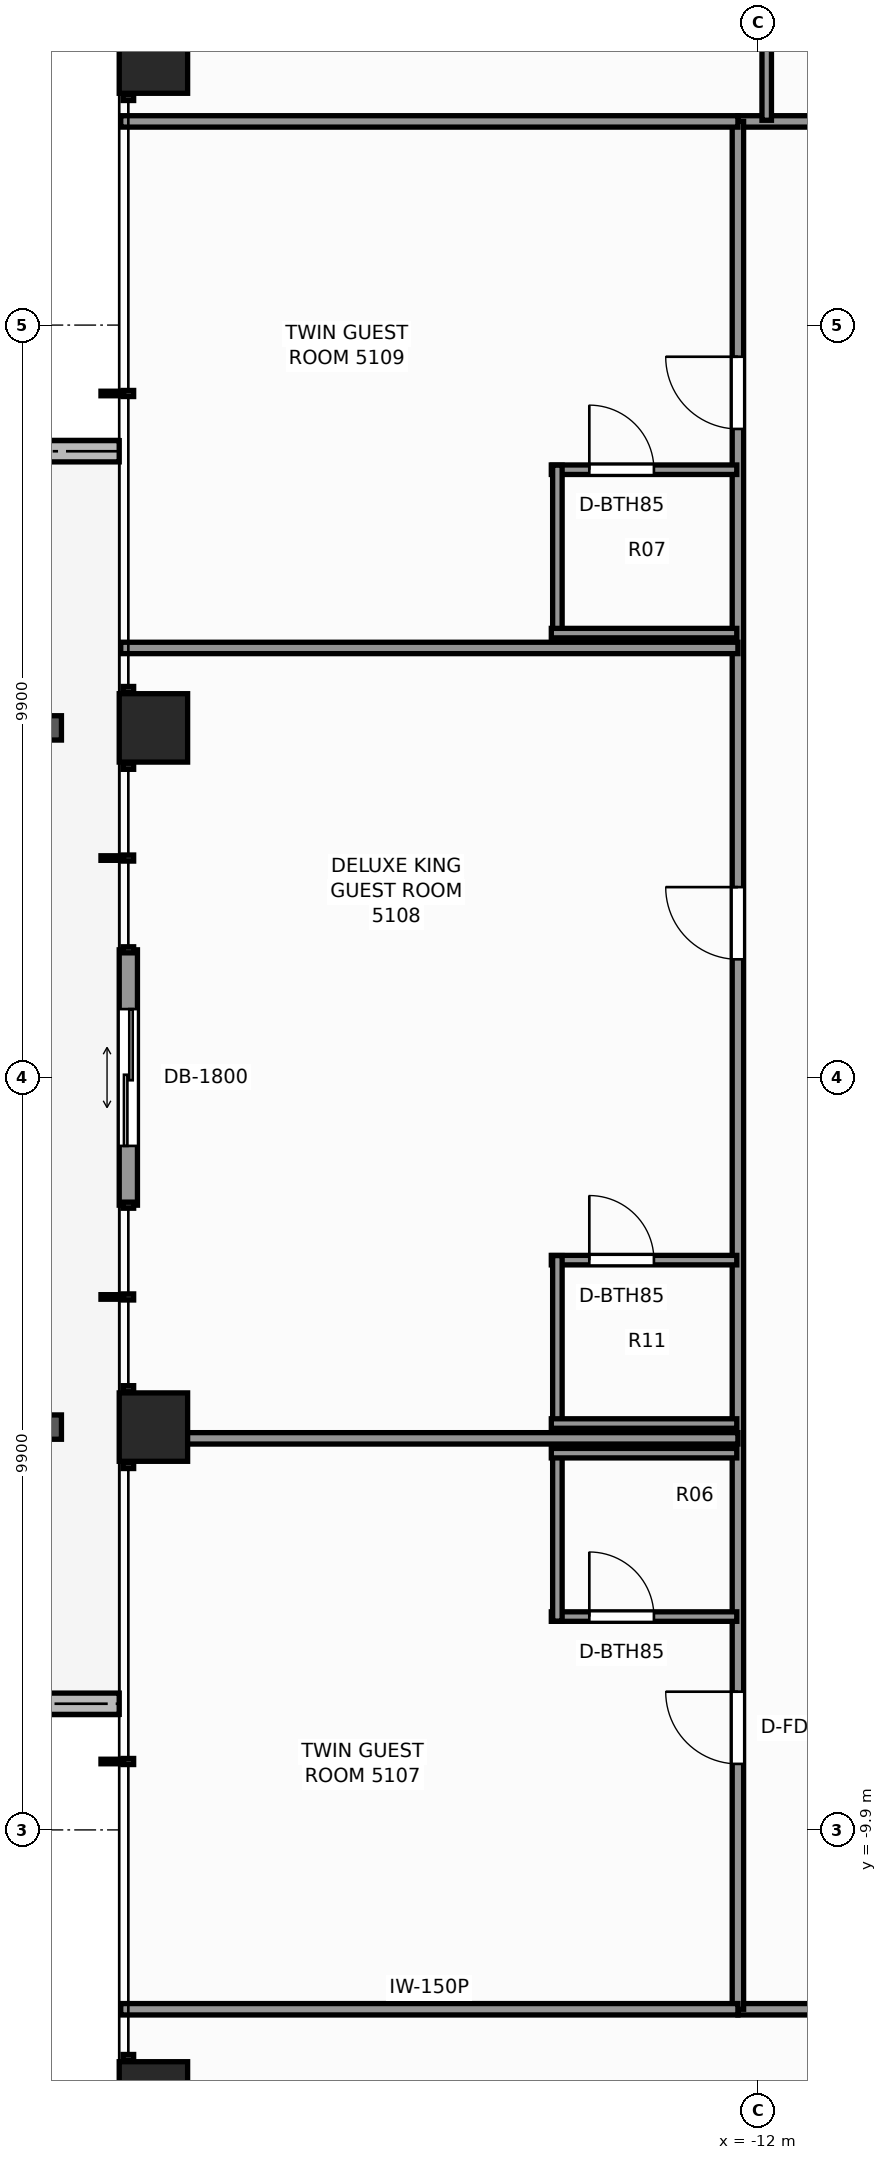
"""IFC4 building model, lengths in metres.
Left out: names, types, materials, properties, quantities, classifications, styles, units other than length and angle.
Written with IfcOpenShell. Run it as: python <this file> out.ifc"""

import sys

from ifc_helpers import new_model, si_unit, direction, frame, frame_2d, origin, origin_2d, place, context, subcontext, project, spatial, rectangle, extrude, element, fill, save


model = new_model("IFC4")
c1 = context("Model", 3, precision=1e-05, world=origin(), true_north=direction((0.0, 1.0)))
c2 = subcontext(c1, "Body", "Model", "MODEL_VIEW")
j1 = project(units=[si_unit("LENGTHUNIT", "METRE"), si_unit("PLANEANGLEUNIT", "RADIAN")], contexts=[c1])
p1 = place(None, origin())
s1 = spatial("IfcSite", under=j1, at=p1, CompositionType="ELEMENT")
p2 = place(p1, origin())
s2 = spatial("IfcBuilding", under=s1, at=p2, CompositionType="ELEMENT")
p3 = place(p2, frame((0.0, 0.0, 176.7)))
s3 = spatial("IfcBuildingStorey", under=s2, at=p3, CompositionType="ELEMENT", Elevation=176.7)
for number, where, z_axis, x_axis in (
    (1, (-19.95, -13.4, 0.0), (0.0, 0.0, 1.0), (1.0, 0.0, 0.0)),
    (2, (-19.95, -4.6, 0.0), (0.0, 0.0, 1.0), (1.0, 0.0, 0.0)),
    (3, (-19.95, 4.6, 0.0), (0.0, 0.0, 1.0), (1.0, 0.0, 0.0)),
    (4, (-19.95, 13.4, 0.0), (0.0, 0.0, 1.0), (1.0, 0.0, 0.0)),
):
    element("IfcColumn", number, at=place(p3, frame(where, z_axis=z_axis, x_axis=x_axis)), inside=s3, PredefinedType="COLUMN", context=c2, shape_type="SweptSolid", body=[
        extrude(rectangle(XDim=0.9, YDim=0.9, at=origin_2d()), origin(), (0.0, 0.0, 1.0), 3.3),
    ])
p4 = place(p3, frame((-22.406, -8.24, -0.04), z_axis=(0.0, 0.0, 1.0), x_axis=(1.0, 0.0, 0.0)))
e5 = element("IfcWall", 5, at=p4, inside=s3, PredefinedType="PARAPET", context=c2, shape_type="SweptSolid", body=[
    extrude(rectangle(XDim=2.006, YDim=0.28, at=frame_2d((1.003, 0.0))), origin(), (0.0, 0.0, 1.0), 0.42),
])
p5 = place(p3, frame((-20.4, 8.24, -0.04), z_axis=(0.0, 0.0, 1.0), x_axis=(-1.0, 0.0, 0.0)))
e6 = element("IfcWall", 6, at=p5, inside=s3, PredefinedType="PARAPET", context=c2, shape_type="SweptSolid", body=[
    extrude(rectangle(XDim=1.26, YDim=0.28, at=frame_2d((0.63, 0.0))), origin(), (0.0, 0.0, 1.0), 0.42),
])
p6 = place(p3, frame((-20.28, -1.68, 0.0), z_axis=(0.0, 0.0, 1.0), x_axis=(0.0, 1.0, 0.0)))
e7 = element("IfcWall", 7, at=p6, inside=s3, PredefinedType="STANDARD", context=c2, shape_type="SweptSolid", body=[
    extrude(rectangle(XDim=3.36, YDim=0.24, at=frame_2d((1.68, 0.0))), origin(), (0.0, 0.0, 1.0), 3.08),
])
p7 = place(p6, frame((0.78, 0.0, 0.0)))
e8 = element("IfcOpeningElement", 8, at=p7, cuts=e7, PredefinedType="OPENING", context=c2, shape_type="SweptSolid", body=[
    extrude(rectangle(XDim=1.8, YDim=2.2, at=frame_2d((0.9, 1.1))), frame((0.0, 0.13, 0.0), z_axis=(0.0, -1.0, 0.0), x_axis=(1.0, 0.0, 0.0)), (0.0, 0.0, 1.0), 0.26),
])
p8 = place(p3, frame((-12.26, -12.26, 0.0), z_axis=(0.0, 0.0, 1.0), x_axis=(1.0, 0.0, 0.0)))
e9 = element("IfcWall", 9, at=p8, inside=s3, PredefinedType="PARTITIONING", context=c2, shape_type="SweptSolid", body=[
    extrude(rectangle(XDim=24.84, YDim=0.15, at=frame_2d((12.42, 0.0))), origin(), (0.0, 0.0, 1.0), 2.369),
])
p9 = place(p8, frame((2.944, 0.0, 0.0)))
e10 = element("IfcOpeningElement", 10, at=p9, cuts=e9, PredefinedType="OPENING", context=c2, shape_type="SweptSolid", body=[
    extrude(rectangle(XDim=0.9, YDim=2.06, at=frame_2d((0.45, 1.03))), frame((0.0, 0.085, 0.0), z_axis=(0.0, -1.0, 0.0), x_axis=(1.0, 0.0, 0.0)), (0.0, 0.0, 1.0), 0.17),
])
p10 = place(p8, frame((4.945, 0.0, 0.0)))
e11 = element("IfcOpeningElement", 11, at=p10, cuts=e9, PredefinedType="OPENING", context=c2, shape_type="SweptSolid", body=[
    extrude(rectangle(XDim=0.9, YDim=2.06, at=frame_2d((0.45, 1.03))), frame((0.0, 0.085, 0.0), z_axis=(0.0, -1.0, 0.0), x_axis=(1.0, 0.0, 0.0)), (0.0, 0.0, 1.0), 0.17),
])
p11 = place(p8, frame((8.611, 0.0, 0.0)))
e12 = element("IfcOpeningElement", 12, at=p11, cuts=e9, PredefinedType="OPENING", context=c2, shape_type="SweptSolid", body=[
    extrude(rectangle(XDim=0.95, YDim=2.06, at=frame_2d((0.475, 1.03))), frame((0.0, 0.085, 0.0), z_axis=(0.0, -1.0, 0.0), x_axis=(1.0, 0.0, 0.0)), (0.0, 0.0, 1.0), 0.17),
])
p12 = place(p8, frame((13.84, 0.0, 0.0)))
e13 = element("IfcOpeningElement", 13, at=p12, cuts=e9, PredefinedType="OPENING", context=c2, shape_type="SweptSolid", body=[
    extrude(rectangle(XDim=0.9, YDim=2.06, at=frame_2d((0.45, 1.03))), frame((0.0, 0.085, 0.0), z_axis=(0.0, -1.0, 0.0), x_axis=(1.0, 0.0, 0.0)), (0.0, 0.0, 1.0), 0.17),
])
p13 = place(p8, frame((18.5, 0.0, 0.0)))
e14 = element("IfcOpeningElement", 14, at=p13, cuts=e9, PredefinedType="OPENING", context=c2, shape_type="SweptSolid", body=[
    extrude(rectangle(XDim=0.9, YDim=2.06, at=frame_2d((0.45, 1.03))), frame((0.0, 0.085, 0.0), z_axis=(0.0, -1.0, 0.0), x_axis=(1.0, 0.0, 0.0)), (0.0, 0.0, 1.0), 0.17),
])
p14 = place(p8, frame((20.552, 0.0, 0.0)))
e15 = element("IfcOpeningElement", 15, at=p14, cuts=e9, PredefinedType="OPENING", context=c2, shape_type="SweptSolid", body=[
    extrude(rectangle(XDim=0.95, YDim=2.06, at=frame_2d((0.475, 1.03))), frame((0.0, 0.085, 0.0), z_axis=(0.0, -1.0, 0.0), x_axis=(1.0, 0.0, 0.0)), (0.0, 0.0, 1.0), 0.17),
])
p15 = place(p3, frame((-12.26, 12.58, 0.0), z_axis=(0.0, 0.0, 1.0), x_axis=(1.0, 0.0, 0.0)))
e16 = element("IfcWall", 16, at=p15, inside=s3, PredefinedType="PARTITIONING", context=c2, shape_type="SweptSolid", body=[
    extrude(rectangle(XDim=24.84, YDim=0.15, at=frame_2d((12.42, 0.0))), origin(), (0.0, 0.0, 1.0), 2.369),
])
p16 = place(p15, frame((3.323, 0.0, 0.0)))
e17 = element("IfcOpeningElement", 17, at=p16, cuts=e16, PredefinedType="OPENING", context=c2, shape_type="SweptSolid", body=[
    extrude(rectangle(XDim=0.95, YDim=2.06, at=frame_2d((0.475, 1.03))), frame((0.0, 0.085, 0.0), z_axis=(0.0, -1.0, 0.0), x_axis=(1.0, 0.0, 0.0)), (0.0, 0.0, 1.0), 0.17),
])
p17 = place(p15, frame((5.538, 0.0, 0.0)))
e18 = element("IfcOpeningElement", 18, at=p17, cuts=e16, PredefinedType="OPENING", context=c2, shape_type="SweptSolid", body=[
    extrude(rectangle(XDim=0.9, YDim=2.06, at=frame_2d((0.45, 1.03))), frame((0.0, 0.085, 0.0), z_axis=(0.0, -1.0, 0.0), x_axis=(1.0, 0.0, 0.0)), (0.0, 0.0, 1.0), 0.17),
])
p18 = place(p15, frame((10.153, 0.0, 0.0)))
e19 = element("IfcOpeningElement", 19, at=p18, cuts=e16, PredefinedType="OPENING", context=c2, shape_type="SweptSolid", body=[
    extrude(rectangle(XDim=0.95, YDim=2.06, at=frame_2d((0.475, 1.03))), frame((0.0, 0.085, 0.0), z_axis=(0.0, -1.0, 0.0), x_axis=(1.0, 0.0, 0.0)), (0.0, 0.0, 1.0), 0.17),
])
p19 = place(p15, frame((18.497, 0.0, 0.0)))
e20 = element("IfcOpeningElement", 20, at=p19, cuts=e16, PredefinedType="OPENING", context=c2, shape_type="SweptSolid", body=[
    extrude(rectangle(XDim=0.95, YDim=2.06, at=frame_2d((0.475, 1.03))), frame((0.0, 0.085, 0.0), z_axis=(0.0, -1.0, 0.0), x_axis=(1.0, 0.0, 0.0)), (0.0, 0.0, 1.0), 0.17),
])
p20 = place(p15, frame((20.836, 0.0, 0.0)))
e21 = element("IfcOpeningElement", 21, at=p20, cuts=e16, PredefinedType="OPENING", context=c2, shape_type="SweptSolid", body=[
    extrude(rectangle(XDim=0.9, YDim=2.06, at=frame_2d((0.45, 1.03))), frame((0.0, 0.085, 0.0), z_axis=(0.0, -1.0, 0.0), x_axis=(1.0, 0.0, 0.0)), (0.0, 0.0, 1.0), 0.17),
])
p21 = place(p3, frame((-12.26, -12.26, 0.0), z_axis=(0.0, 0.0, 1.0), x_axis=(0.0, 1.0, 0.0)))
e22 = element("IfcWall", 22, at=p21, inside=s3, PredefinedType="PARTITIONING", context=c2, shape_type="SweptSolid", body=[
    extrude(rectangle(XDim=24.84, YDim=0.15, at=frame_2d((12.42, 0.0))), origin(), (0.0, 0.0, 1.0), 2.369),
])
p22 = place(p21, frame((3.229, 0.0, 0.0)))
e23 = element("IfcOpeningElement", 23, at=p22, cuts=e22, PredefinedType="OPENING", context=c2, shape_type="SweptSolid", body=[
    extrude(rectangle(XDim=0.95, YDim=2.06, at=frame_2d((0.475, 1.03))), frame((0.0, 0.085, 0.0), z_axis=(0.0, -1.0, 0.0), x_axis=(1.0, 0.0, 0.0)), (0.0, 0.0, 1.0), 0.17),
])
p23 = place(p21, frame((13.815, 0.0, 0.0)))
e24 = element("IfcOpeningElement", 24, at=p23, cuts=e22, PredefinedType="OPENING", context=c2, shape_type="SweptSolid", body=[
    extrude(rectangle(XDim=0.95, YDim=2.06, at=frame_2d((0.475, 1.03))), frame((0.0, 0.085, 0.0), z_axis=(0.0, -1.0, 0.0), x_axis=(1.0, 0.0, 0.0)), (0.0, 0.0, 1.0), 0.17),
])
p24 = place(p21, frame((20.793, 0.0, 0.0)))
e25 = element("IfcOpeningElement", 25, at=p24, cuts=e22, PredefinedType="OPENING", context=c2, shape_type="SweptSolid", body=[
    extrude(rectangle(XDim=0.95, YDim=2.06, at=frame_2d((0.475, 1.03))), frame((0.0, 0.085, 0.0), z_axis=(0.0, -1.0, 0.0), x_axis=(1.0, 0.0, 0.0)), (0.0, 0.0, 1.0), 0.17),
])
for number, where, z_axis, x_axis in (
    (26, (-20.38, -12.26, 0.0), (0.0, 0.0, 1.0), (1.0, 0.0, 0.0)),
    (27, (-20.38, 12.58, 0.0), (0.0, 0.0, 1.0), (1.0, 0.0, 0.0)),
    (28, (-20.38, -4.748, 0.0), (0.0, 0.0, 1.0), (1.0, 0.0, 0.0)),
):
    element("IfcWall", number, at=place(p3, frame(where, z_axis=z_axis, x_axis=x_axis)), inside=s3, PredefinedType="PARTITIONING", context=c2, shape_type="SweptSolid", body=[
        extrude(rectangle(XDim=8.12, YDim=0.15, at=frame_2d((4.06, 0.0))), origin(), (0.0, 0.0, 1.0), 2.369),
    ])
p25 = place(p3, frame((-14.715, -7.093, 0.0), z_axis=(0.0, 0.0, 1.0), x_axis=(1.0, 0.0, 0.0)))
e29 = element("IfcWall", 29, at=p25, inside=s3, PredefinedType="PARTITIONING", context=c2, shape_type="SweptSolid", body=[
    extrude(rectangle(XDim=2.44, YDim=0.125, at=frame_2d((1.22, 0.0))), origin(), (0.0, 0.0, 1.0), 3.08),
])
p26 = place(p25, frame((0.5, 0.0, 0.0)))
e30 = element("IfcOpeningElement", 30, at=p26, cuts=e29, PredefinedType="OPENING", context=c2, shape_type="SweptSolid", body=[
    extrude(rectangle(XDim=0.85, YDim=2.03, at=frame_2d((0.425, 1.015))), frame((0.0, 0.073, 0.0), z_axis=(0.0, -1.0, 0.0), x_axis=(1.0, 0.0, 0.0)), (0.0, 0.0, 1.0), 0.145),
])
p27 = place(p3, frame((-14.635, -7.153, 0.0), z_axis=(0.0, 0.0, 1.0), x_axis=(0.0, 1.0, 0.0)))
e31 = element("IfcWall", 31, at=p27, inside=s3, PredefinedType="PARTITIONING", context=c2, shape_type="SweptSolid", body=[
    extrude(rectangle(XDim=2.27, YDim=0.125, at=frame_2d((1.135, 0.0))), origin(), (0.0, 0.0, 1.0), 3.08),
])
p28 = place(p3, frame((-14.715, -4.943, 0.0), z_axis=(0.0, 0.0, 1.0), x_axis=(1.0, 0.0, 0.0)))
e32 = element("IfcWall", 32, at=p28, inside=s3, PredefinedType="PARTITIONING", context=c2, shape_type="SweptSolid", body=[
    extrude(rectangle(XDim=2.44, YDim=0.125, at=frame_2d((1.22, 0.0))), origin(), (0.0, 0.0, 1.0), 3.08),
])
p29 = place(p3, frame((-20.38, 5.652, 0.0), z_axis=(0.0, 0.0, 1.0), x_axis=(1.0, 0.0, 0.0)))
e33 = element("IfcWall", 33, at=p29, inside=s3, PredefinedType="PARTITIONING", context=c2, shape_type="SweptSolid", body=[
    extrude(rectangle(XDim=8.12, YDim=0.15, at=frame_2d((4.06, 0.0))), origin(), (0.0, 0.0, 1.0), 2.453),
])
p30 = place(p3, frame((-14.715, -2.403, 0.0), z_axis=(0.0, 0.0, 1.0), x_axis=(1.0, 0.0, 0.0)))
e34 = element("IfcWall", 34, at=p30, inside=s3, PredefinedType="PARTITIONING", context=c2, shape_type="SweptSolid", body=[
    extrude(rectangle(XDim=2.44, YDim=0.125, at=frame_2d((1.22, 0.0))), origin(), (0.0, 0.0, 1.0), 3.08),
])
p31 = place(p30, frame((0.5, 0.0, 0.0)))
e35 = element("IfcOpeningElement", 35, at=p31, cuts=e34, PredefinedType="OPENING", context=c2, shape_type="SweptSolid", body=[
    extrude(rectangle(XDim=0.85, YDim=2.03, at=frame_2d((0.425, 1.015))), frame((0.0, 0.073, 0.0), z_axis=(0.0, -1.0, 0.0), x_axis=(1.0, 0.0, 0.0)), (0.0, 0.0, 1.0), 0.145),
])
p32 = place(p3, frame((-14.635, -4.613, 0.0), z_axis=(0.0, 0.0, 1.0), x_axis=(0.0, 1.0, 0.0)))
e36 = element("IfcWall", 36, at=p32, inside=s3, PredefinedType="PARTITIONING", context=c2, shape_type="SweptSolid", body=[
    extrude(rectangle(XDim=2.27, YDim=0.125, at=frame_2d((1.135, 0.0))), origin(), (0.0, 0.0, 1.0), 2.369),
])
p33 = place(p3, frame((-14.715, -4.553, 0.0), z_axis=(0.0, 0.0, 1.0), x_axis=(1.0, 0.0, 0.0)))
e37 = element("IfcWall", 37, at=p33, inside=s3, PredefinedType="PARTITIONING", context=c2, shape_type="SweptSolid", body=[
    extrude(rectangle(XDim=2.44, YDim=0.125, at=frame_2d((1.22, 0.0))), origin(), (0.0, 0.0, 1.0), 2.369),
])
p34 = place(p3, frame((-14.715, 7.997, 0.0), z_axis=(0.0, 0.0, 1.0), x_axis=(1.0, 0.0, 0.0)))
e38 = element("IfcWall", 38, at=p34, inside=s3, PredefinedType="PARTITIONING", context=c2, shape_type="SweptSolid", body=[
    extrude(rectangle(XDim=2.44, YDim=0.125, at=frame_2d((1.22, 0.0))), origin(), (0.0, 0.0, 1.0), 3.08),
])
p35 = place(p34, frame((0.5, 0.0, 0.0)))
e39 = element("IfcOpeningElement", 39, at=p35, cuts=e38, PredefinedType="OPENING", context=c2, shape_type="SweptSolid", body=[
    extrude(rectangle(XDim=0.85, YDim=2.03, at=frame_2d((0.425, 1.015))), frame((0.0, 0.073, 0.0), z_axis=(0.0, -1.0, 0.0), x_axis=(1.0, 0.0, 0.0)), (0.0, 0.0, 1.0), 0.145),
])
p36 = place(p3, frame((-14.635, 5.787, 0.0), z_axis=(0.0, 0.0, 1.0), x_axis=(0.0, 1.0, 0.0)))
e40 = element("IfcWall", 40, at=p36, inside=s3, PredefinedType="PARTITIONING", context=c2, shape_type="SweptSolid", body=[
    extrude(rectangle(XDim=2.27, YDim=0.125, at=frame_2d((1.135, 0.0))), origin(), (0.0, 0.0, 1.0), 3.08),
])
p37 = place(p3, frame((-14.715, 5.847, 0.0), z_axis=(0.0, 0.0, 1.0), x_axis=(1.0, 0.0, 0.0)))
e41 = element("IfcWall", 41, at=p37, inside=s3, PredefinedType="PARTITIONING", context=c2, shape_type="SweptSolid", body=[
    extrude(rectangle(XDim=2.44, YDim=0.125, at=frame_2d((1.22, 0.0))), origin(), (0.0, 0.0, 1.0), 3.08),
])
p38 = place(p3, frame((-11.881, 12.595, 0.0), z_axis=(0.0, 0.0, 1.0), x_axis=(0.0, 1.0, 0.0)))
e42 = element("IfcWall", 42, at=p38, inside=s3, PredefinedType="PARTITIONING", context=c2, shape_type="SweptSolid", body=[
    extrude(rectangle(XDim=2.44, YDim=0.125, at=frame_2d((1.22, 0.0))), origin(), (0.0, 0.0, 1.0), 2.369),
])
p39 = place(p7, origin())
e43 = element("IfcDoor", 43, at=p39, inside=s3, OperationType="DOUBLE_DOOR_SLIDING", PredefinedType="DOOR", context=c2, shape_type="SweptSolid", body=[
    extrude(rectangle(XDim=1.8, YDim=2.2, at=frame_2d((0.9, 1.1))), frame((0.0, 0.025, 0.0), z_axis=(0.0, -1.0, 0.0), x_axis=(1.0, 0.0, 0.0)), (0.0, 0.0, 1.0), 0.05),
])
fill(e8, e43)
p40 = place(p26, origin())
e44 = element("IfcDoor", 44, at=p40, inside=s3, OperationType="SINGLE_SWING_LEFT", PredefinedType="DOOR", context=c2, shape_type="SweptSolid", body=[
    extrude(rectangle(XDim=0.85, YDim=2.03, at=frame_2d((0.425, 1.015))), frame((0.0, 0.025, 0.0), z_axis=(0.0, -1.0, 0.0), x_axis=(1.0, 0.0, 0.0)), (0.0, 0.0, 1.0), 0.05),
])
fill(e30, e44)
p41 = place(p22, origin())
e45 = element("IfcDoor", 45, at=p41, inside=s3, OperationType="SINGLE_SWING_RIGHT", PredefinedType="DOOR", context=c2, shape_type="SweptSolid", body=[
    extrude(rectangle(XDim=0.95, YDim=2.06, at=frame_2d((0.475, 1.03))), frame((0.0, 0.025, 0.0), z_axis=(0.0, -1.0, 0.0), x_axis=(1.0, 0.0, 0.0)), (0.0, 0.0, 1.0), 0.05),
])
fill(e23, e45)
p42 = place(p31, origin())
e46 = element("IfcDoor", 46, at=p42, inside=s3, OperationType="SINGLE_SWING_LEFT", PredefinedType="DOOR", context=c2, shape_type="SweptSolid", body=[
    extrude(rectangle(XDim=0.85, YDim=2.03, at=frame_2d((0.425, 1.015))), frame((0.0, 0.025, 0.0), z_axis=(0.0, -1.0, 0.0), x_axis=(1.0, 0.0, 0.0)), (0.0, 0.0, 1.0), 0.05),
])
fill(e35, e46)
p43 = place(p23, origin())
e47 = element("IfcDoor", 47, at=p43, inside=s3, OperationType="SINGLE_SWING_RIGHT", PredefinedType="DOOR", context=c2, shape_type="SweptSolid", body=[
    extrude(rectangle(XDim=0.95, YDim=2.06, at=frame_2d((0.475, 1.03))), frame((0.0, 0.025, 0.0), z_axis=(0.0, -1.0, 0.0), x_axis=(1.0, 0.0, 0.0)), (0.0, 0.0, 1.0), 0.05),
])
fill(e24, e47)
p44 = place(p35, origin())
e48 = element("IfcDoor", 48, at=p44, inside=s3, OperationType="SINGLE_SWING_LEFT", PredefinedType="DOOR", context=c2, shape_type="SweptSolid", body=[
    extrude(rectangle(XDim=0.85, YDim=2.03, at=frame_2d((0.425, 1.015))), frame((0.0, 0.025, 0.0), z_axis=(0.0, -1.0, 0.0), x_axis=(1.0, 0.0, 0.0)), (0.0, 0.0, 1.0), 0.05),
])
fill(e39, e48)
p45 = place(p24, origin())
e49 = element("IfcDoor", 49, at=p45, inside=s3, OperationType="SINGLE_SWING_RIGHT", PredefinedType="DOOR", context=c2, shape_type="SweptSolid", body=[
    extrude(rectangle(XDim=0.95, YDim=2.06, at=frame_2d((0.475, 1.03))), frame((0.0, 0.025, 0.0), z_axis=(0.0, -1.0, 0.0), x_axis=(1.0, 0.0, 0.0)), (0.0, 0.0, 1.0), 0.05),
])
fill(e25, e49)
save(model, sys.argv[1])
